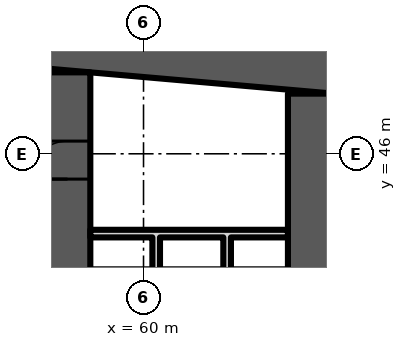
"""IFC4 building model, lengths in metres.
Left out: names, types, materials, properties, quantities, classifications, styles, units other than length and angle.
Written with IfcOpenShell. Run it as: python <this file> out.ifc"""

import sys

from ifc_helpers import new_model, si_unit, direction, frame, frame_2d, origin, place, context, subcontext, project, spatial, polyline, rectangle, outline, extrude, element, fill, save


model = new_model("IFC4")
c1 = context("Model", 3, precision=1e-05, world=origin(), true_north=direction((0.0, 1.0)))
c2 = subcontext(c1, "Body", "Model", "MODEL_VIEW")
j1 = project(units=[si_unit("LENGTHUNIT", "METRE"), si_unit("PLANEANGLEUNIT", "RADIAN")], contexts=[c1])
p1 = place(None, origin())
s1 = spatial("IfcSite", under=j1, at=p1, CompositionType="ELEMENT")
p2 = place(p1, origin())
s2 = spatial("IfcBuilding", under=s1, at=p2, CompositionType="ELEMENT")
p3 = place(p2, frame((0.0, 0.0, 91.9)))
s3 = spatial("IfcBuildingStorey", under=s2, at=p3, CompositionType="ELEMENT", Elevation=91.9)
p4 = place(p3, origin())
e1 = element("IfcWall", 1, at=p4, inside=s3, PredefinedType="SHEAR", context=c2, shape_type="SweptSolid", body=[
    extrude(outline(polyline([(9.0, 47.583), (37.0, 50.032), (65.0, 47.583), (65.0, 48.787), (37.0, 51.237), (9.0, 48.787), (9.0, 47.583)])), origin(), (0.0, 0.0, 1.0), 4.8),
])
p5 = place(p3, frame((58.0, 35.2, 0.0), z_axis=(0.0, 0.0, 1.0), x_axis=(0.0, 1.0, 0.0)))
e2 = element("IfcWall", 2, at=p5, inside=s3, PredefinedType="SHEAR", context=c2, shape_type="SweptSolid", body=[
    extrude(rectangle(XDim=12.943, YDim=1.2, at=frame_2d((6.471, 0.0))), origin(), (0.0, 0.0, 1.0), 4.8),
])
p6 = place(p5, frame((10.134, 0.0, 0.0)))
e3 = element("IfcOpeningElement", 3, at=p6, cuts=e2, PredefinedType="OPENING", context=c2, shape_type="SweptSolid", body=[
    extrude(rectangle(XDim=1.0, YDim=2.1, at=frame_2d((0.5, 1.05))), frame((0.0, 0.61, 0.0), z_axis=(0.0, -1.0, 0.0), x_axis=(1.0, 0.0, 0.0)), (0.0, 0.0, 1.0), 1.22),
])
p7 = place(p5, frame((3.2, 0.0, 0.0)))
e4 = element("IfcOpeningElement", 4, at=p7, cuts=e2, PredefinedType="OPENING", context=c2, shape_type="SweptSolid", body=[
    extrude(rectangle(XDim=1.1, YDim=2.1, at=frame_2d((0.55, 1.05))), frame((0.0, 0.61, 0.0), z_axis=(0.0, -1.0, 0.0), x_axis=(1.0, 0.0, 0.0)), (0.0, 0.0, 1.0), 1.22),
])
p8 = place(p3, frame((64.4, 35.2, 0.0), z_axis=(0.0, 0.0, 1.0), x_axis=(0.0, 1.0, 0.0)))
e5 = element("IfcWall", 5, at=p8, inside=s3, PredefinedType="SHEAR", context=c2, shape_type="SweptSolid", body=[
    extrude(rectangle(XDim=12.383, YDim=1.2, at=frame_2d((6.191, 0.0))), origin(), (0.0, 0.0, 1.0), 4.8),
])
p9 = place(p3, origin())
e6 = element("IfcWall", 6, at=p9, inside=s3, PredefinedType="PARTITIONING", context=c2, shape_type="SweptSolid", body=[
    extrude(outline(polyline([(60.433, 40.8), (60.233, 40.8), (60.233, 43.8), (58.6, 43.8), (58.6, 44.0), (63.8, 44.0), (63.8, 43.8), (62.3, 43.8), (62.3, 40.8), (62.1, 40.8), (62.1, 43.8), (60.433, 43.8), (60.433, 40.8)])), origin(), (0.0, 0.0, 1.0), 4.4),
])
p10 = place(p6, origin())
e7 = element("IfcDoor", 7, at=p10, inside=s3, OperationType="SINGLE_SWING_LEFT", PredefinedType="DOOR", context=c2, shape_type="SweptSolid", body=[
    extrude(rectangle(XDim=1.0, YDim=2.1, at=frame_2d((0.5, 1.05))), frame((0.0, 0.6, 0.0), z_axis=(0.0, -1.0, 0.0), x_axis=(1.0, 0.0, 0.0)), (0.0, 0.0, 1.0), 1.199),
])
fill(e3, e7)
save(model, sys.argv[1])
